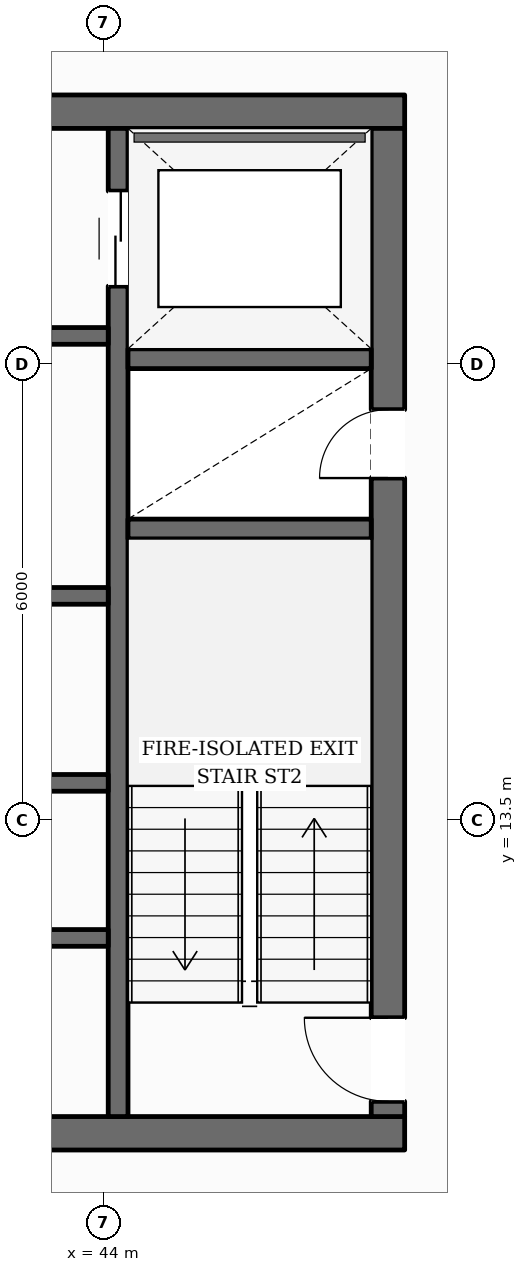
"""IFC4 building model, lengths in metres.
Left out: names, types, materials, properties, quantities, classifications, styles, units other than length and angle.
Written with IfcOpenShell. Run it as: python <this file> out.ifc"""

import sys

from ifc_helpers import new_model, si_unit, direction, frame, frame_2d, origin, place, context, subcontext, project, spatial, rectangle, extrude, element, fill, save


model = new_model("IFC4")
c1 = context("Model", 3, precision=1e-05, world=origin(), true_north=direction((0.0, 1.0)))
c2 = subcontext(c1, "Body", "Model", "MODEL_VIEW")
j1 = project(units=[si_unit("LENGTHUNIT", "METRE"), si_unit("PLANEANGLEUNIT", "RADIAN")], contexts=[c1])
p1 = place(None, origin())
s1 = spatial("IfcSite", under=j1, at=p1, CompositionType="ELEMENT")
p2 = place(p1, origin())
s2 = spatial("IfcBuilding", under=s1, at=p2, CompositionType="ELEMENT")
p3 = place(p2, frame((0.0, 0.0, 207.35)))
s3 = spatial("IfcBuildingStorey", under=s2, at=p3, CompositionType="ELEMENT", Elevation=207.35)
p4 = place(p3, frame((28.04, 9.38, 0.0), z_axis=(0.0, 0.0, 1.0), x_axis=(1.0, 0.0, 0.0)))
e1 = element("IfcWall", 1, at=p4, inside=s3, PredefinedType="SOLIDWALL", context=c2, shape_type="SweptSolid", body=[
    extrude(rectangle(XDim=19.92, YDim=0.44, at=frame_2d((9.96, 0.0))), origin(), (0.0, 0.0, 1.0), 3.6),
])
p5 = place(p4, frame((10.46, 0.0, 0.0)))
e2 = element("IfcOpeningElement", 2, at=p5, cuts=e1, PredefinedType="OPENING", context=c2, shape_type="SweptSolid", body=[
    extrude(rectangle(XDim=1.4, YDim=2.2, at=frame_2d((0.7, 1.1))), frame((0.0, 0.23, 0.0), z_axis=(0.0, -1.0, 0.0), x_axis=(1.0, 0.0, 0.0)), (0.0, 0.0, 1.0), 0.46),
])
p6 = place(p3, frame((28.04, 22.82, 0.0), z_axis=(0.0, 0.0, 1.0), x_axis=(1.0, 0.0, 0.0)))
e3 = element("IfcWall", 3, at=p6, inside=s3, PredefinedType="SOLIDWALL", context=c2, shape_type="SweptSolid", body=[
    extrude(rectangle(XDim=19.92, YDim=0.44, at=frame_2d((9.96, 0.0))), origin(), (0.0, 0.0, 1.0), 3.6),
])
p7 = place(p6, frame((6.235, 0.0, 0.0)))
e4 = element("IfcOpeningElement", 4, at=p7, cuts=e3, PredefinedType="OPENING", context=c2, shape_type="SweptSolid", body=[
    extrude(rectangle(XDim=1.05, YDim=2.15, at=frame_2d((0.525, 1.075))), frame((0.0, 0.23, 0.0), z_axis=(0.0, -1.0, 0.0), x_axis=(1.0, 0.0, 0.0)), (0.0, 0.0, 1.0), 0.46),
])
p8 = place(p6, frame((12.635, 0.0, 0.0)))
e5 = element("IfcOpeningElement", 5, at=p8, cuts=e3, PredefinedType="OPENING", context=c2, shape_type="SweptSolid", body=[
    extrude(rectangle(XDim=1.05, YDim=2.15, at=frame_2d((0.525, 1.075))), frame((0.0, 0.23, 0.0), z_axis=(0.0, -1.0, 0.0), x_axis=(1.0, 0.0, 0.0)), (0.0, 0.0, 1.0), 0.46),
])
p9 = place(p3, frame((47.74, 9.6, 0.0), z_axis=(0.0, 0.0, 1.0), x_axis=(0.0, 1.0, 0.0)))
e6 = element("IfcWall", 6, at=p9, inside=s3, PredefinedType="SOLIDWALL", context=c2, shape_type="SweptSolid", body=[
    extrude(rectangle(XDim=13.0, YDim=0.44, at=frame_2d((6.5, 0.0))), origin(), (0.0, 0.0, 1.0), 3.6),
])
p10 = place(p9, frame((0.2, 0.0, 0.0)))
e7 = element("IfcOpeningElement", 7, at=p10, cuts=e6, PredefinedType="OPENING", context=c2, shape_type="SweptSolid", body=[
    extrude(rectangle(XDim=1.1, YDim=2.15, at=frame_2d((0.55, 1.075))), frame((0.0, 0.23, 0.0), z_axis=(0.0, -1.0, 0.0), x_axis=(1.0, 0.0, 0.0)), (0.0, 0.0, 1.0), 0.46),
])
p11 = place(p9, frame((8.4, 0.0, 0.0)))
e8 = element("IfcOpeningElement", 8, at=p11, cuts=e6, PredefinedType="OPENING", context=c2, shape_type="SweptSolid", body=[
    extrude(rectangle(XDim=0.9, YDim=2.1, at=frame_2d((0.45, 1.05))), frame((0.0, 0.23, 0.0), z_axis=(0.0, -1.0, 0.0), x_axis=(1.0, 0.0, 0.0)), (0.0, 0.0, 1.0), 0.46),
])
p12 = place(p3, frame((44.19, 9.6, 0.0), z_axis=(0.0, 0.0, 1.0), x_axis=(0.0, 1.0, 0.0)))
e9 = element("IfcWall", 9, at=p12, inside=s3, PredefinedType="SHEAR", context=c2, shape_type="SweptSolid", body=[
    extrude(rectangle(XDim=13.0, YDim=0.26, at=frame_2d((6.5, 0.0))), origin(), (0.0, 0.0, 1.0), 3.6),
])
p13 = place(p12, frame((10.925, 0.0, 0.0)))
e10 = element("IfcOpeningElement", 10, at=p13, cuts=e9, PredefinedType="OPENING", context=c2, shape_type="SweptSolid", body=[
    extrude(rectangle(XDim=1.25, YDim=2.25, at=frame_2d((0.625, 1.125))), frame((0.0, 0.14, 0.0), z_axis=(0.0, -1.0, 0.0), x_axis=(1.0, 0.0, 0.0)), (0.0, 0.0, 1.0), 0.28),
])
for number, where, z_axis, x_axis in (
    (11, (44.32, 17.33, 0.0), (0.0, 0.0, 1.0), (1.0, 0.0, 0.0)),
    (12, (44.32, 19.57, 0.0), (0.0, 0.0, 1.0), (1.0, 0.0, 0.0)),
):
    element("IfcWall", number, at=place(p3, frame(where, z_axis=z_axis, x_axis=x_axis)), inside=s3, PredefinedType="SHEAR", context=c2, shape_type="SweptSolid", body=[
        extrude(rectangle(XDim=3.2, YDim=0.26, at=frame_2d((1.6, 0.0))), origin(), (0.0, 0.0, 1.0), 3.6),
    ])
p14 = place(p3, frame((31.94, 19.87, 0.0), z_axis=(0.0, 0.0, 1.0), x_axis=(1.0, 0.0, 0.0)))
e13 = element("IfcWall", 13, at=p14, inside=s3, PredefinedType="SOLIDWALL", context=c2, shape_type="SweptSolid", body=[
    extrude(rectangle(XDim=12.12, YDim=0.22, at=frame_2d((6.06, 0.0))), origin(), (0.0, 0.0, 1.0), 3.6),
])
p15 = place(p14, frame((6.3, 0.0, 0.0)))
e14 = element("IfcOpeningElement", 14, at=p15, cuts=e13, PredefinedType="OPENING", context=c2, shape_type="SweptSolid", body=[
    extrude(rectangle(XDim=1.1, YDim=2.15, at=frame_2d((0.55, 1.075))), frame((0.0, 0.12, 0.0), z_axis=(0.0, -1.0, 0.0), x_axis=(1.0, 0.0, 0.0)), (0.0, 0.0, 1.0), 0.24),
])
p16 = place(p14, frame((8.23, 0.0, 0.0)))
e15 = element("IfcOpeningElement", 15, at=p16, cuts=e13, PredefinedType="OPENING", context=c2, shape_type="SweptSolid", body=[
    extrude(rectangle(XDim=0.9, YDim=2.1, at=frame_2d((0.45, 1.05))), frame((0.0, 0.12, 0.0), z_axis=(0.0, -1.0, 0.0), x_axis=(1.0, 0.0, 0.0)), (0.0, 0.0, 1.0), 0.24),
])
p17 = place(p14, frame((10.45, 0.0, 0.0)))
e16 = element("IfcOpeningElement", 16, at=p17, cuts=e13, PredefinedType="OPENING", context=c2, shape_type="SweptSolid", body=[
    extrude(rectangle(XDim=0.9, YDim=2.1, at=frame_2d((0.45, 1.05))), frame((0.0, 0.12, 0.0), z_axis=(0.0, -1.0, 0.0), x_axis=(1.0, 0.0, 0.0)), (0.0, 0.0, 1.0), 0.24),
])
p18 = place(p3, frame((31.94, 16.45, 0.0), z_axis=(0.0, 0.0, 1.0), x_axis=(1.0, 0.0, 0.0)))
e17 = element("IfcWall", 17, at=p18, inside=s3, PredefinedType="SOLIDWALL", context=c2, shape_type="SweptSolid", body=[
    extrude(rectangle(XDim=12.12, YDim=0.22, at=frame_2d((6.06, 0.0))), origin(), (0.0, 0.0, 1.0), 3.6),
])
p19 = place(p3, frame((31.94, 13.99, 0.0), z_axis=(0.0, 0.0, 1.0), x_axis=(1.0, 0.0, 0.0)))
e18 = element("IfcWall", 18, at=p19, inside=s3, PredefinedType="SOLIDWALL", context=c2, shape_type="SweptSolid", body=[
    extrude(rectangle(XDim=12.12, YDim=0.22, at=frame_2d((6.06, 0.0))), origin(), (0.0, 0.0, 1.0), 3.6),
])
p20 = place(p19, frame((1.11, 0.0, 0.0)))
e19 = element("IfcOpeningElement", 19, at=p20, cuts=e18, PredefinedType="OPENING", context=c2, shape_type="SweptSolid", body=[
    extrude(rectangle(XDim=0.9, YDim=2.1, at=frame_2d((0.45, 1.05))), frame((0.0, 0.12, 0.0), z_axis=(0.0, -1.0, 0.0), x_axis=(1.0, 0.0, 0.0)), (0.0, 0.0, 1.0), 0.24),
])
p21 = place(p19, frame((5.16, 0.0, 0.0)))
e20 = element("IfcOpeningElement", 20, at=p21, cuts=e18, PredefinedType="OPENING", context=c2, shape_type="SweptSolid", body=[
    extrude(rectangle(XDim=0.9, YDim=2.1, at=frame_2d((0.45, 1.05))), frame((0.0, 0.12, 0.0), z_axis=(0.0, -1.0, 0.0), x_axis=(1.0, 0.0, 0.0)), (0.0, 0.0, 1.0), 0.24),
])
p22 = place(p19, frame((9.61, 0.0, 0.0)))
e21 = element("IfcOpeningElement", 21, at=p22, cuts=e18, PredefinedType="OPENING", context=c2, shape_type="SweptSolid", body=[
    extrude(rectangle(XDim=0.9, YDim=2.1, at=frame_2d((0.45, 1.05))), frame((0.0, 0.12, 0.0), z_axis=(0.0, -1.0, 0.0), x_axis=(1.0, 0.0, 0.0)), (0.0, 0.0, 1.0), 0.24),
])
p23 = place(p3, frame((40.28, 11.95, 0.0), z_axis=(0.0, 0.0, 1.0), x_axis=(1.0, 0.0, 0.0)))
e22 = element("IfcWall", 22, at=p23, inside=s3, PredefinedType="SOLIDWALL", context=c2, shape_type="SweptSolid", body=[
    extrude(rectangle(XDim=3.78, YDim=0.22, at=frame_2d((1.89, 0.0))), origin(), (0.0, 0.0, 1.0), 3.6),
])
p24 = place(p23, frame((1.55, 0.0, 0.0)))
e23 = element("IfcOpeningElement", 23, at=p24, cuts=e22, PredefinedType="OPENING", context=c2, shape_type="SweptSolid", body=[
    extrude(rectangle(XDim=0.9, YDim=2.1, at=frame_2d((0.45, 1.05))), frame((0.0, 0.12, 0.0), z_axis=(0.0, -1.0, 0.0), x_axis=(1.0, 0.0, 0.0)), (0.0, 0.0, 1.0), 0.24),
])
p25 = place(p3, frame((42.167, 44.113, 0.0), z_axis=(0.0, 0.0, 1.0), x_axis=(0.50509390827, -0.863064391473, 0.0)))
e24 = element("IfcWall", 24, at=p25, inside=s3, PredefinedType="STANDARD", context=c2, shape_type="SweptSolid", body=[
    extrude(rectangle(XDim=38.167, YDim=0.35, at=frame_2d((19.083, 0.0))), origin(), (0.0, 0.0, 1.0), 3.132),
])
p26 = place(p25, frame((28.025, 0.0, 0.0)))
e25 = element("IfcOpeningElement", 25, at=p26, cuts=e24, PredefinedType="OPENING", context=c2, shape_type="SweptSolid", body=[
    extrude(rectangle(XDim=1.0, YDim=2.2, at=frame_2d((0.5, 1.1))), frame((0.0, 0.185, 0.0), z_axis=(0.0, -1.0, 0.0), x_axis=(1.0, 0.0, 0.0)), (0.0, 0.0, 1.0), 0.37),
])
p27 = place(p25, frame((33.859, 0.0, 0.65)))
e26 = element("IfcOpeningElement", 26, at=p27, cuts=e24, PredefinedType="OPENING", context=c2, shape_type="SweptSolid", body=[
    extrude(rectangle(XDim=1.45, YDim=1.75, at=frame_2d((0.725, 0.875))), frame((0.0, 0.185, 0.0), z_axis=(0.0, -1.0, 0.0), x_axis=(1.0, 0.0, 0.0)), (0.0, 0.0, 1.0), 0.37),
])
p28 = place(p25, frame((21.456, 0.0, 0.65)))
e27 = element("IfcOpeningElement", 27, at=p28, cuts=e24, PredefinedType="OPENING", context=c2, shape_type="SweptSolid", body=[
    extrude(rectangle(XDim=1.45, YDim=1.75, at=frame_2d((0.725, 0.875))), frame((0.0, 0.185, 0.0), z_axis=(0.0, -1.0, 0.0), x_axis=(1.0, 0.0, 0.0)), (0.0, 0.0, 1.0), 0.37),
])
p29 = place(p25, frame((9.053, 0.0, 0.65)))
e28 = element("IfcOpeningElement", 28, at=p29, cuts=e24, PredefinedType="OPENING", context=c2, shape_type="SweptSolid", body=[
    extrude(rectangle(XDim=1.45, YDim=1.75, at=frame_2d((0.725, 0.875))), frame((0.0, 0.185, 0.0), z_axis=(0.0, -1.0, 0.0), x_axis=(1.0, 0.0, 0.0)), (0.0, 0.0, 1.0), 0.37),
])
p30 = place(p25, frame((2.852, 0.0, 0.65)))
e29 = element("IfcOpeningElement", 29, at=p30, cuts=e24, PredefinedType="OPENING", context=c2, shape_type="SweptSolid", body=[
    extrude(rectangle(XDim=1.45, YDim=1.75, at=frame_2d((0.725, 0.875))), frame((0.0, 0.185, 0.0), z_axis=(0.0, -1.0, 0.0), x_axis=(1.0, 0.0, 0.0)), (0.0, 0.0, 1.0), 0.37),
])
p31 = place(p10, origin())
e30 = element("IfcDoor", 30, at=p31, inside=s3, OperationType="SINGLE_SWING_RIGHT", PredefinedType="DOOR", context=c2, shape_type="SweptSolid", body=[
    extrude(rectangle(XDim=1.1, YDim=2.15, at=frame_2d((0.55, 1.075))), frame((0.0, 0.025, 0.0), z_axis=(0.0, -1.0, 0.0), x_axis=(1.0, 0.0, 0.0)), (0.0, 0.0, 1.0), 0.05),
])
fill(e7, e30)
p32 = place(p11, origin())
e31 = element("IfcDoor", 31, at=p32, inside=s3, OperationType="SINGLE_SWING_LEFT", PredefinedType="DOOR", context=c2, shape_type="SweptSolid", body=[
    extrude(rectangle(XDim=0.9, YDim=2.1, at=frame_2d((0.45, 1.05))), frame((0.0, 0.025, 0.0), z_axis=(0.0, -1.0, 0.0), x_axis=(1.0, 0.0, 0.0)), (0.0, 0.0, 1.0), 0.05),
])
fill(e8, e31)
p33 = place(p13, origin())
e32 = element("IfcDoor", 32, at=p33, inside=s3, OperationType="DOUBLE_DOOR_SLIDING", PredefinedType="DOOR", context=c2, shape_type="SweptSolid", body=[
    extrude(rectangle(XDim=1.25, YDim=2.25, at=frame_2d((0.625, 1.125))), frame((0.0, 0.025, 0.0), z_axis=(0.0, -1.0, 0.0), x_axis=(1.0, 0.0, 0.0)), (0.0, 0.0, 1.0), 0.05),
])
fill(e10, e32)
save(model, sys.argv[1])
